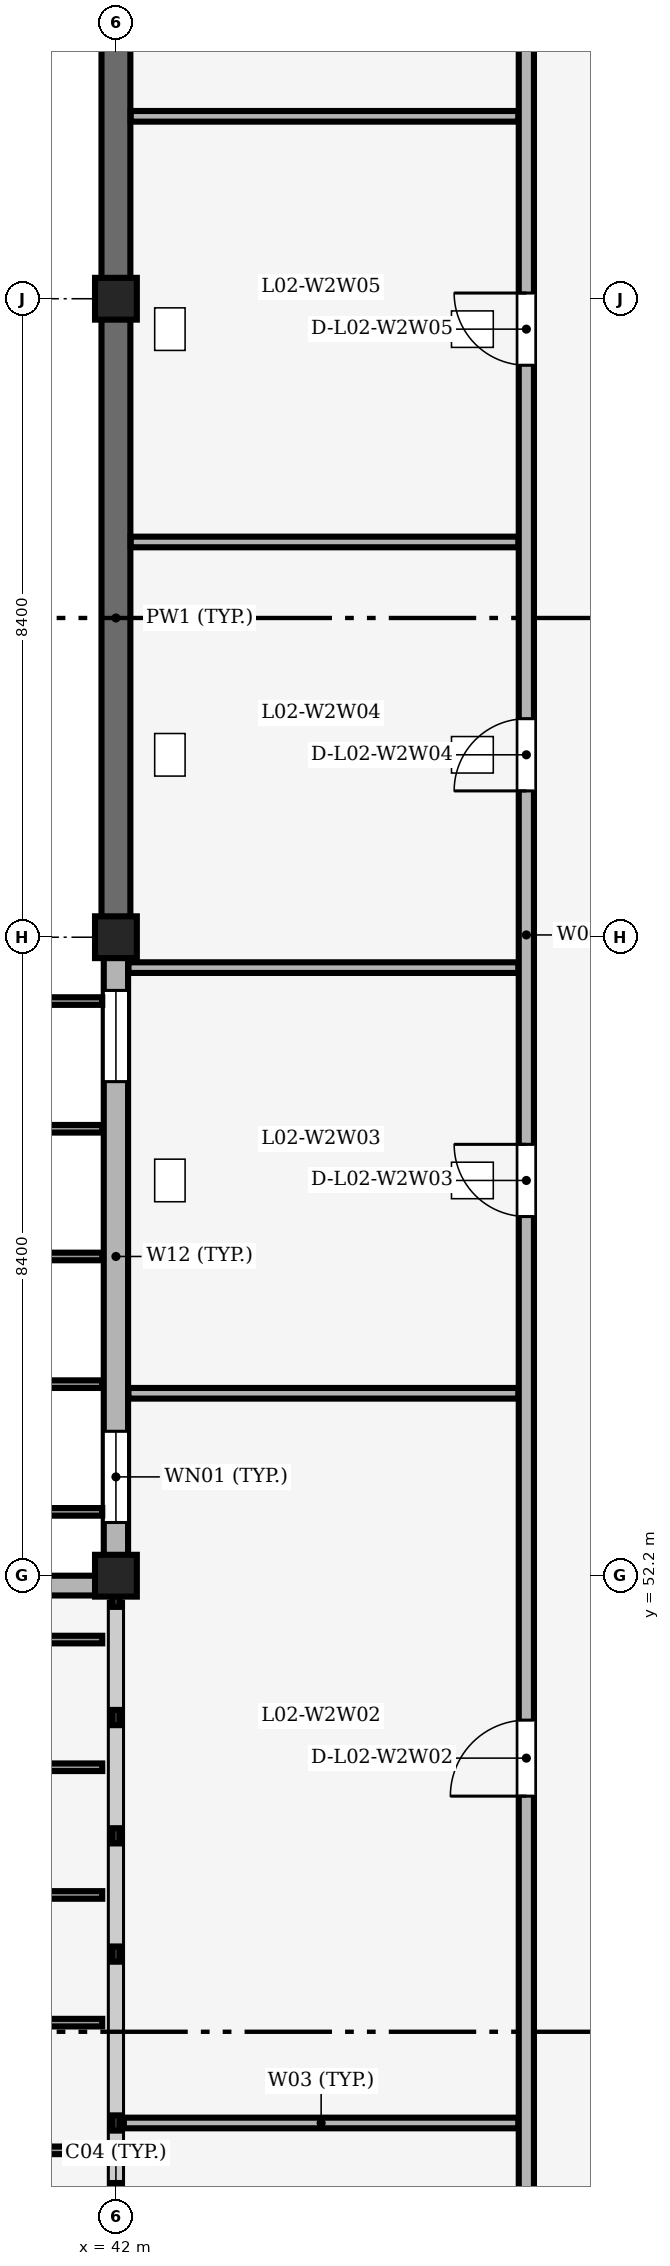
"""IFC4 building model, lengths in metres.
Left out: names, types, materials, properties, quantities, classifications, styles, units other than length and angle.
Written with IfcOpenShell. Run it as: python <this file> out.ifc"""

import sys

from ifc_helpers import new_model, si_unit, direction, frame, frame_2d, origin, origin_2d, place, context, subcontext, project, spatial, rectangle, extrude, element, fill, save


model = new_model("IFC4")
c1 = context("Model", 3, precision=1e-05, world=origin(), true_north=direction((0.0, 1.0)))
c2 = subcontext(c1, "Body", "Model", "MODEL_VIEW")
j1 = project(units=[si_unit("LENGTHUNIT", "METRE"), si_unit("PLANEANGLEUNIT", "RADIAN")], contexts=[c1])
p1 = place(None, origin())
s1 = spatial("IfcSite", under=j1, at=p1, CompositionType="ELEMENT")
p2 = place(p1, origin())
s2 = spatial("IfcBuilding", under=s1, at=p2, CompositionType="ELEMENT")
p3 = place(p2, frame((0.0, 0.0, 9.0)))
s3 = spatial("IfcBuildingStorey", under=s2, at=p3, CompositionType="ELEMENT", Elevation=9.0)
for number, where, z_axis, x_axis in (
    (1, (42.0, 52.2, 0.0), (0.0, 0.0, 1.0), (1.0, 0.0, 0.0)),
    (2, (42.0, 60.6, 0.0), (0.0, 0.0, 1.0), (1.0, 0.0, 0.0)),
    (3, (42.0, 69.0, 0.0), (0.0, 0.0, 1.0), (1.0, 0.0, 0.0)),
):
    element("IfcColumn", number, at=place(p3, frame(where, z_axis=z_axis, x_axis=x_axis)), inside=s3, PredefinedType="COLUMN", context=c2, shape_type="SweptSolid", body=[
        extrude(rectangle(XDim=0.55, YDim=0.55, at=origin_2d()), origin(), (0.0, 0.0, 1.0), 4.2),
    ])
p4 = place(p3, frame((42.0, 52.45, 0.0), z_axis=(0.0, 0.0, 1.0), x_axis=(0.0, 1.0, 0.0)))
e4 = element("IfcWall", 4, at=p4, inside=s3, PredefinedType="SOLIDWALL", context=c2, shape_type="SweptSolid", body=[
    extrude(rectangle(XDim=7.9, YDim=0.32, at=frame_2d((3.95, 0.0))), origin(), (0.0, 0.0, 1.0), 2.96),
])
p5 = place(p4, frame((0.45, 0.0, 0.85)))
e5 = element("IfcOpeningElement", 5, at=p5, cuts=e4, PredefinedType="OPENING", context=c2, shape_type="SweptSolid", body=[
    extrude(rectangle(XDim=1.2, YDim=1.5, at=frame_2d((0.6, 0.75))), frame((0.0, 0.17, 0.0), z_axis=(0.0, -1.0, 0.0), x_axis=(1.0, 0.0, 0.0)), (0.0, 0.0, 1.0), 0.34),
])
p6 = place(p4, frame((6.25, 0.0, 0.85)))
e6 = element("IfcOpeningElement", 6, at=p6, cuts=e4, PredefinedType="OPENING", context=c2, shape_type="SweptSolid", body=[
    extrude(rectangle(XDim=1.2, YDim=1.5, at=frame_2d((0.6, 0.75))), frame((0.0, 0.17, 0.0), z_axis=(0.0, -1.0, 0.0), x_axis=(1.0, 0.0, 0.0)), (0.0, 0.0, 1.0), 0.34),
])
p7 = place(p3, frame((42.0, 60.85, 0.0), z_axis=(0.0, 0.0, 1.0), x_axis=(0.0, 1.0, 0.0)))
e7 = element("IfcWall", 7, at=p7, inside=s3, PredefinedType="SHEAR", context=c2, shape_type="SweptSolid", body=[
    extrude(rectangle(XDim=7.9, YDim=0.38, at=frame_2d((3.95, 0.0))), origin(), (0.0, 0.0, 1.0), 2.91),
])
p8 = place(p3, frame((42.0, 69.25, 0.0), z_axis=(0.0, 0.0, 1.0), x_axis=(0.0, 1.0, 0.0)))
e8 = element("IfcWall", 8, at=p8, inside=s3, PredefinedType="SHEAR", context=c2, shape_type="SweptSolid", body=[
    extrude(rectangle(XDim=7.9, YDim=0.38, at=frame_2d((3.95, 0.0))), origin(), (0.0, 0.0, 1.0), 2.81),
])
p9 = place(p3, frame((25.33, 52.07, 0.0), z_axis=(0.0, 0.0, 1.0), x_axis=(1.0, 0.0, 0.0)))
e9 = element("IfcWall", 9, at=p9, inside=s3, PredefinedType="PARAPET", context=c2, shape_type="SweptSolid", body=[
    extrude(rectangle(XDim=16.54, YDim=0.26, at=frame_2d((8.27, 0.0))), origin(), (0.0, 0.0, 1.0), 0.85),
])
p10 = place(p3, frame((42.105, 45.0, 0.0), z_axis=(0.0, 0.0, 1.0), x_axis=(1.0, 0.0, 0.0)))
e10 = element("IfcWall", 10, at=p10, inside=s3, PredefinedType="PARTITIONING", context=c2, shape_type="SweptSolid", body=[
    extrude(rectangle(XDim=5.19, YDim=0.14, at=frame_2d((2.595, 0.0))), origin(), (0.0, 0.0, 1.0), 3.9),
])
p11 = place(p3, frame((42.165, 54.6, 0.0), z_axis=(0.0, 0.0, 1.0), x_axis=(1.0, 0.0, 0.0)))
e11 = element("IfcWall", 11, at=p11, inside=s3, PredefinedType="PARTITIONING", context=c2, shape_type="SweptSolid", body=[
    extrude(rectangle(XDim=5.13, YDim=0.14, at=frame_2d((2.565, 0.0))), origin(), (0.0, 0.0, 1.0), 3.51),
])
p12 = place(p3, frame((42.165, 60.2, 0.0), z_axis=(0.0, 0.0, 1.0), x_axis=(1.0, 0.0, 0.0)))
e12 = element("IfcWall", 12, at=p12, inside=s3, PredefinedType="PARTITIONING", context=c2, shape_type="SweptSolid", body=[
    extrude(rectangle(XDim=5.13, YDim=0.14, at=frame_2d((2.565, 0.0))), origin(), (0.0, 0.0, 1.0), 2.96),
])
p13 = place(p3, frame((42.195, 65.8, 0.0), z_axis=(0.0, 0.0, 1.0), x_axis=(1.0, 0.0, 0.0)))
e13 = element("IfcWall", 13, at=p13, inside=s3, PredefinedType="PARTITIONING", context=c2, shape_type="SweptSolid", body=[
    extrude(rectangle(XDim=5.1, YDim=0.14, at=frame_2d((2.55, 0.0))), origin(), (0.0, 0.0, 1.0), 3.9),
])
p14 = place(p3, frame((42.195, 71.4, 0.0), z_axis=(0.0, 0.0, 1.0), x_axis=(1.0, 0.0, 0.0)))
e14 = element("IfcWall", 14, at=p14, inside=s3, PredefinedType="PARTITIONING", context=c2, shape_type="SweptSolid", body=[
    extrude(rectangle(XDim=5.1, YDim=0.14, at=frame_2d((2.55, 0.0))), origin(), (0.0, 0.0, 1.0), 3.51),
])
p15 = place(p3, frame((47.4, 35.565, 0.0), z_axis=(0.0, 0.0, 1.0), x_axis=(0.0, 1.0, 0.0)))
e15 = element("IfcWall", 15, at=p15, inside=s3, PredefinedType="PARTITIONING", context=c2, shape_type="SweptSolid", body=[
    extrude(rectangle(XDim=50.13, YDim=0.2, at=frame_2d((25.065, 0.0))), origin(), (0.0, 0.0, 1.0), 3.9),
])
p16 = place(p15, frame((4.135, 0.0, 0.0)))
e16 = element("IfcOpeningElement", 16, at=p16, cuts=e15, PredefinedType="OPENING", context=c2, shape_type="SweptSolid", body=[
    extrude(rectangle(XDim=1.0, YDim=2.15, at=frame_2d((0.5, 1.075))), frame((0.0, 0.11, 0.0), z_axis=(0.0, -1.0, 0.0), x_axis=(1.0, 0.0, 0.0)), (0.0, 0.0, 1.0), 0.22),
])
p17 = place(p15, frame((13.735, 0.0, 0.0)))
e17 = element("IfcOpeningElement", 17, at=p17, cuts=e15, PredefinedType="OPENING", context=c2, shape_type="SweptSolid", body=[
    extrude(rectangle(XDim=1.0, YDim=2.15, at=frame_2d((0.5, 1.075))), frame((0.0, 0.11, 0.0), z_axis=(0.0, -1.0, 0.0), x_axis=(1.0, 0.0, 0.0)), (0.0, 0.0, 1.0), 0.22),
])
p18 = place(p15, frame((21.36, 0.0, 0.0)))
e18 = element("IfcOpeningElement", 18, at=p18, cuts=e15, PredefinedType="OPENING", context=c2, shape_type="SweptSolid", body=[
    extrude(rectangle(XDim=0.95, YDim=2.2, at=frame_2d((0.475, 1.1))), frame((0.0, 0.11, 0.0), z_axis=(0.0, -1.0, 0.0), x_axis=(1.0, 0.0, 0.0)), (0.0, 0.0, 1.0), 0.22),
])
p19 = place(p15, frame((26.96, 0.0, 0.0)))
e19 = element("IfcOpeningElement", 19, at=p19, cuts=e15, PredefinedType="OPENING", context=c2, shape_type="SweptSolid", body=[
    extrude(rectangle(XDim=0.95, YDim=2.2, at=frame_2d((0.475, 1.1))), frame((0.0, 0.11, 0.0), z_axis=(0.0, -1.0, 0.0), x_axis=(1.0, 0.0, 0.0)), (0.0, 0.0, 1.0), 0.22),
])
p20 = place(p15, frame((32.56, 0.0, 0.0)))
e20 = element("IfcOpeningElement", 20, at=p20, cuts=e15, PredefinedType="OPENING", context=c2, shape_type="SweptSolid", body=[
    extrude(rectangle(XDim=0.95, YDim=2.1, at=frame_2d((0.475, 1.05))), frame((0.0, 0.11, 0.0), z_axis=(0.0, -1.0, 0.0), x_axis=(1.0, 0.0, 0.0)), (0.0, 0.0, 1.0), 0.22),
])
p21 = place(p15, frame((38.935, 0.0, 0.0)))
e21 = element("IfcOpeningElement", 21, at=p21, cuts=e15, PredefinedType="OPENING", context=c2, shape_type="SweptSolid", body=[
    extrude(rectangle(XDim=1.0, YDim=2.15, at=frame_2d((0.5, 1.075))), frame((0.0, 0.11, 0.0), z_axis=(0.0, -1.0, 0.0), x_axis=(1.0, 0.0, 0.0)), (0.0, 0.0, 1.0), 0.22),
])
p22 = place(p15, frame((46.135, 0.0, 0.0)))
e22 = element("IfcOpeningElement", 22, at=p22, cuts=e15, PredefinedType="OPENING", context=c2, shape_type="SweptSolid", body=[
    extrude(rectangle(XDim=1.0, YDim=2.15, at=frame_2d((0.5, 1.075))), frame((0.0, 0.11, 0.0), z_axis=(0.0, -1.0, 0.0), x_axis=(1.0, 0.0, 0.0)), (0.0, 0.0, 1.0), 0.22),
])
p23 = place(p5, origin())
e23 = element("IfcWindow", 23, at=p23, inside=s3, PartitioningType="SINGLE_PANEL", PredefinedType="WINDOW", context=c2, shape_type="SweptSolid", body=[
    extrude(rectangle(XDim=1.2, YDim=1.5, at=frame_2d((0.6, 0.75))), frame((0.0, 0.03, 0.0), z_axis=(0.0, -1.0, 0.0), x_axis=(1.0, 0.0, 0.0)), (0.0, 0.0, 1.0), 0.06),
])
fill(e5, e23)
p24 = place(p6, origin())
e24 = element("IfcWindow", 24, at=p24, inside=s3, PartitioningType="SINGLE_PANEL", PredefinedType="WINDOW", context=c2, shape_type="SweptSolid", body=[
    extrude(rectangle(XDim=1.2, YDim=1.5, at=frame_2d((0.6, 0.75))), frame((0.0, 0.03, 0.0), z_axis=(0.0, -1.0, 0.0), x_axis=(1.0, 0.0, 0.0)), (0.0, 0.0, 1.0), 0.06),
])
fill(e6, e24)
p25 = place(p17, origin())
e25 = element("IfcDoor", 25, at=p25, inside=s3, OperationType="SINGLE_SWING_LEFT", PredefinedType="DOOR", context=c2, shape_type="SweptSolid", body=[
    extrude(rectangle(XDim=1.0, YDim=2.15, at=frame_2d((0.5, 1.075))), frame((0.0, 0.025, 0.0), z_axis=(0.0, -1.0, 0.0), x_axis=(1.0, 0.0, 0.0)), (0.0, 0.0, 1.0), 0.05),
])
fill(e17, e25)
p26 = place(p18, origin())
e26 = element("IfcDoor", 26, at=p26, inside=s3, OperationType="SINGLE_SWING_RIGHT", PredefinedType="DOOR", context=c2, shape_type="SweptSolid", body=[
    extrude(rectangle(XDim=0.95, YDim=2.2, at=frame_2d((0.475, 1.1))), frame((0.0, 0.025, 0.0), z_axis=(0.0, -1.0, 0.0), x_axis=(1.0, 0.0, 0.0)), (0.0, 0.0, 1.0), 0.05),
])
fill(e18, e26)
p27 = place(p19, origin())
e27 = element("IfcDoor", 27, at=p27, inside=s3, OperationType="SINGLE_SWING_LEFT", PredefinedType="DOOR", context=c2, shape_type="SweptSolid", body=[
    extrude(rectangle(XDim=0.95, YDim=2.2, at=frame_2d((0.475, 1.1))), frame((0.0, 0.025, 0.0), z_axis=(0.0, -1.0, 0.0), x_axis=(1.0, 0.0, 0.0)), (0.0, 0.0, 1.0), 0.05),
])
fill(e19, e27)
p28 = place(p20, origin())
e28 = element("IfcDoor", 28, at=p28, inside=s3, OperationType="SINGLE_SWING_RIGHT", PredefinedType="DOOR", context=c2, shape_type="SweptSolid", body=[
    extrude(rectangle(XDim=0.95, YDim=2.1, at=frame_2d((0.475, 1.05))), frame((0.0, 0.025, 0.0), z_axis=(0.0, -1.0, 0.0), x_axis=(1.0, 0.0, 0.0)), (0.0, 0.0, 1.0), 0.05),
])
fill(e20, e28)
save(model, sys.argv[1])
